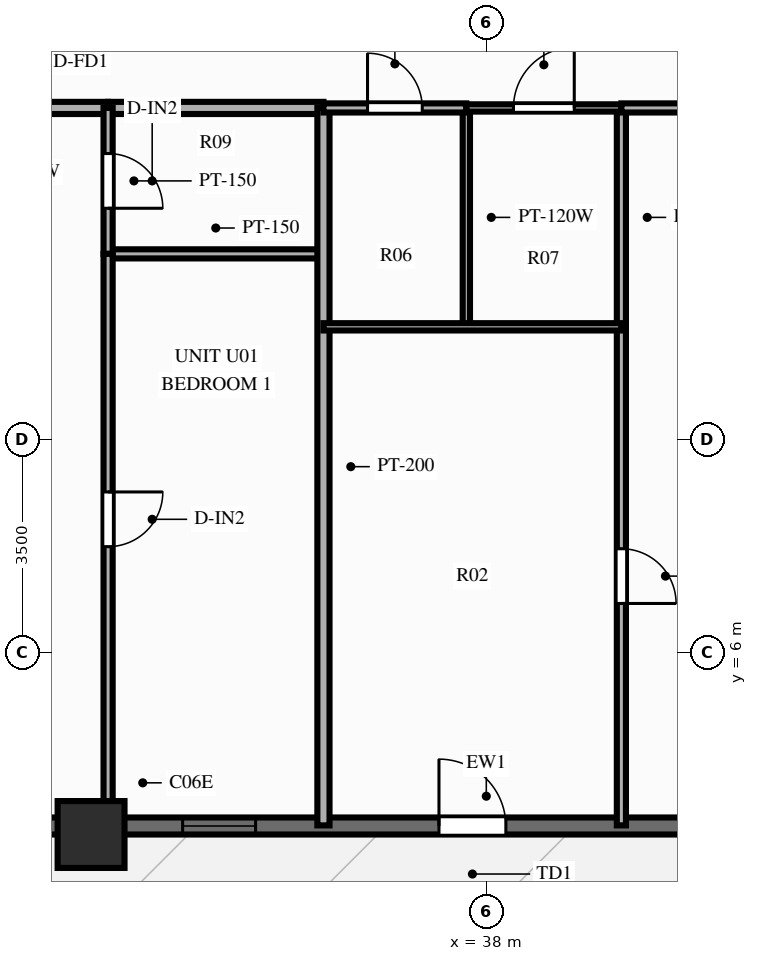
"""IFC4 building model, lengths in metres.
Left out: names, types, materials, properties, quantities, classifications, styles, units other than length and angle.
Written with IfcOpenShell. Run it as: python <this file> out.ifc"""

import sys

from ifc_helpers import new_model, si_unit, direction, frame, frame_2d, origin, origin_2d, place, context, subcontext, project, spatial, rectangle, extrude, source, transform, mapped, element, fill, save


model = new_model("IFC4")
c1 = context("Model", 3, precision=1e-05, world=origin(), true_north=direction((0.0, 1.0)))
c2 = subcontext(c1, "Body", "Model", "MODEL_VIEW")
j1 = project(units=[si_unit("LENGTHUNIT", "METRE"), si_unit("PLANEANGLEUNIT", "RADIAN")], contexts=[c1])
p1 = place(None, origin())
s1 = spatial("IfcSite", under=j1, at=p1, CompositionType="ELEMENT")
p2 = place(p1, origin())
s2 = spatial("IfcBuilding", under=s1, at=p2, CompositionType="ELEMENT")
p3 = place(p2, frame((0.0, 0.0, 49.4)))
s3 = spatial("IfcBuildingStorey", under=s2, at=p3, CompositionType="ELEMENT", Elevation=49.4)
m1 = source(origin(), c2, "Body", "SweptSolid", [
    extrude(rectangle(XDim=1.1, YDim=1.1, at=origin_2d()), origin(), (0.0, 0.0, 1.0), 3.0),
])
p4 = place(p3, frame((31.5, 3.0, 0.0), z_axis=(0.0, 0.0, 1.0), x_axis=(1.0, 0.0, 0.0)))
e1 = element("IfcColumn", 1, at=p4, inside=s3, PredefinedType="COLUMN", context=c2, shape_type="MappedRepresentation", body=[
    mapped(m1, transform((0.0, 0.0, 0.0), scale=1.0)),
])
p5 = place(p3, frame((15.5, 3.14, 0.0), z_axis=(0.0, 0.0, 1.0), x_axis=(1.0, 0.0, 0.0)))
e2 = element("IfcWall", 2, at=p5, inside=s3, PredefinedType="SOLIDWALL", context=c2, shape_type="SweptSolid", body=[
    extrude(rectangle(XDim=45.0, YDim=0.28, at=frame_2d((22.5, 0.0))), origin(), (0.0, 0.0, 1.0), 2.28),
])
p6 = place(p5, frame((2.135, 0.0, 0.25)))
e3 = element("IfcOpeningElement", 3, at=p6, cuts=e2, PredefinedType="OPENING", context=c2, shape_type="SweptSolid", body=[
    extrude(rectangle(XDim=1.2, YDim=1.5, at=frame_2d((0.6, 0.75))), frame((0.0, 0.152, 0.0), z_axis=(0.0, -1.0, 0.0), x_axis=(1.0, 0.0, 0.0)), (0.0, 0.0, 1.0), 0.304),
])
p7 = place(p5, frame((6.94, 0.0, 0.25)))
e4 = element("IfcOpeningElement", 4, at=p7, cuts=e2, PredefinedType="OPENING", context=c2, shape_type="SweptSolid", body=[
    extrude(rectangle(XDim=1.2, YDim=1.5, at=frame_2d((0.6, 0.75))), frame((0.0, 0.152, 0.0), z_axis=(0.0, -1.0, 0.0), x_axis=(1.0, 0.0, 0.0)), (0.0, 0.0, 1.0), 0.304),
])
p8 = place(p5, frame((10.776, 0.0, 0.25)))
e5 = element("IfcOpeningElement", 5, at=p8, cuts=e2, PredefinedType="OPENING", context=c2, shape_type="SweptSolid", body=[
    extrude(rectangle(XDim=1.2, YDim=1.5, at=frame_2d((0.6, 0.75))), frame((0.0, 0.152, 0.0), z_axis=(0.0, -1.0, 0.0), x_axis=(1.0, 0.0, 0.0)), (0.0, 0.0, 1.0), 0.304),
])
p9 = place(p5, frame((13.58, 0.0, 0.25)))
e6 = element("IfcOpeningElement", 6, at=p9, cuts=e2, PredefinedType="OPENING", context=c2, shape_type="SweptSolid", body=[
    extrude(rectangle(XDim=1.2, YDim=1.5, at=frame_2d((0.6, 0.75))), frame((0.0, 0.152, 0.0), z_axis=(0.0, -1.0, 0.0), x_axis=(1.0, 0.0, 0.0)), (0.0, 0.0, 1.0), 0.304),
])
p10 = place(p5, frame((17.506, 0.0, 0.25)))
e7 = element("IfcOpeningElement", 7, at=p10, cuts=e2, PredefinedType="OPENING", context=c2, shape_type="SweptSolid", body=[
    extrude(rectangle(XDim=1.2, YDim=1.5, at=frame_2d((0.6, 0.75))), frame((0.0, 0.152, 0.0), z_axis=(0.0, -1.0, 0.0), x_axis=(1.0, 0.0, 0.0)), (0.0, 0.0, 1.0), 0.304),
])
p11 = place(p5, frame((22.822, 0.0, 0.0), z_axis=(0.0, 0.0, 1.0), x_axis=(-1.0, 0.0, 0.0)))
e8 = element("IfcOpeningElement", 8, at=p11, cuts=e2, PredefinedType="OPENING", context=c2, shape_type="SweptSolid", body=[
    extrude(rectangle(XDim=1.1, YDim=2.15, at=frame_2d((0.55, 1.075))), frame((0.0, 0.152, 0.0), z_axis=(0.0, -1.0, 0.0), x_axis=(1.0, 0.0, 0.0)), (0.0, 0.0, 1.0), 0.304),
])
p12 = place(p5, frame((26.066, 0.0, 0.25)))
e9 = element("IfcOpeningElement", 9, at=p12, cuts=e2, PredefinedType="OPENING", context=c2, shape_type="SweptSolid", body=[
    extrude(rectangle(XDim=1.2, YDim=1.5, at=frame_2d((0.6, 0.75))), frame((0.0, 0.152, 0.0), z_axis=(0.0, -1.0, 0.0), x_axis=(1.0, 0.0, 0.0)), (0.0, 0.0, 1.0), 0.304),
])
p13 = place(p5, frame((30.255, 0.0, 0.25)))
e10 = element("IfcOpeningElement", 10, at=p13, cuts=e2, PredefinedType="OPENING", context=c2, shape_type="SweptSolid", body=[
    extrude(rectangle(XDim=1.2, YDim=1.5, at=frame_2d((0.6, 0.75))), frame((0.0, 0.152, 0.0), z_axis=(0.0, -1.0, 0.0), x_axis=(1.0, 0.0, 0.0)), (0.0, 0.0, 1.0), 0.304),
])
p14 = place(p5, frame((33.346, 0.0, 0.25)))
e11 = element("IfcOpeningElement", 11, at=p14, cuts=e2, PredefinedType="OPENING", context=c2, shape_type="SweptSolid", body=[
    extrude(rectangle(XDim=1.2, YDim=1.5, at=frame_2d((0.6, 0.75))), frame((0.0, 0.152, 0.0), z_axis=(0.0, -1.0, 0.0), x_axis=(1.0, 0.0, 0.0)), (0.0, 0.0, 1.0), 0.304),
])
p15 = place(p5, frame((37.821, 0.0, 0.25)))
e12 = element("IfcOpeningElement", 12, at=p15, cuts=e2, PredefinedType="OPENING", context=c2, shape_type="SweptSolid", body=[
    extrude(rectangle(XDim=1.2, YDim=1.5, at=frame_2d((0.6, 0.75))), frame((0.0, 0.152, 0.0), z_axis=(0.0, -1.0, 0.0), x_axis=(1.0, 0.0, 0.0)), (0.0, 0.0, 1.0), 0.304),
])
p16 = place(p5, frame((42.341, 0.0, 0.25)))
e13 = element("IfcOpeningElement", 13, at=p16, cuts=e2, PredefinedType="OPENING", context=c2, shape_type="SweptSolid", body=[
    extrude(rectangle(XDim=1.2, YDim=1.5, at=frame_2d((0.6, 0.75))), frame((0.0, 0.152, 0.0), z_axis=(0.0, -1.0, 0.0), x_axis=(1.0, 0.0, 0.0)), (0.0, 0.0, 1.0), 0.304),
])
p17 = place(p3, frame((28.25, 14.95, 0.0), z_axis=(0.0, 0.0, 1.0), x_axis=(1.0, 0.0, 0.0)))
e14 = element("IfcWall", 14, at=p17, inside=s3, PredefinedType="PARTITIONING", context=c2, shape_type="SweptSolid", body=[
    extrude(rectangle(XDim=3.53, YDim=0.2, at=frame_2d((1.765, 0.0))), origin(), (0.0, 0.0, 1.0), 2.79),
])
p18 = place(p17, frame((1.097, 0.0, 0.0)))
e15 = element("IfcOpeningElement", 15, at=p18, cuts=e14, PredefinedType="OPENING", context=c2, shape_type="SweptSolid", body=[
    extrude(rectangle(XDim=1.0, YDim=2.15, at=frame_2d((0.5, 1.075))), frame((0.0, 0.112, 0.0), z_axis=(0.0, -1.0, 0.0), x_axis=(1.0, 0.0, 0.0)), (0.0, 0.0, 1.0), 0.224),
])
p19 = place(p3, frame((31.78, 14.95, 0.0), z_axis=(0.0, 0.0, 1.0), x_axis=(1.0, 0.0, 0.0)))
e16 = element("IfcWall", 16, at=p19, inside=s3, PredefinedType="PARTITIONING", context=c2, shape_type="SweptSolid", body=[
    extrude(rectangle(XDim=3.542, YDim=0.2, at=frame_2d((1.771, 0.0))), origin(), (0.0, 0.0, 1.0), 2.79),
])
p20 = place(p3, frame((31.78, 12.55, 0.0), z_axis=(0.0, 0.0, 1.0), x_axis=(1.0, 0.0, 0.0)))
e17 = element("IfcWall", 17, at=p20, inside=s3, PredefinedType="PARTITIONING", context=c2, shape_type="SweptSolid", body=[
    extrude(rectangle(XDim=3.542, YDim=0.15, at=frame_2d((1.771, 0.0))), origin(), (0.0, 0.0, 1.0), 2.79),
])
p21 = place(p3, frame((31.78, 14.95, 0.0), z_axis=(0.0, 0.0, 1.0), x_axis=(0.0, -1.0, 0.0)))
e18 = element("IfcWall", 18, at=p21, inside=s3, PredefinedType="PARTITIONING", context=c2, shape_type="SweptSolid", body=[
    extrude(rectangle(XDim=2.4, YDim=0.15, at=frame_2d((1.2, 0.0))), origin(), (0.0, 0.0, 1.0), 2.79),
])
p22 = place(p21, frame((0.75, 0.0, 0.0)))
e19 = element("IfcOpeningElement", 19, at=p22, cuts=e18, PredefinedType="OPENING", context=c2, shape_type="SweptSolid", body=[
    extrude(rectangle(XDim=0.9, YDim=2.1, at=frame_2d((0.45, 1.05))), frame((0.0, 0.087, 0.0), z_axis=(0.0, -1.0, 0.0), x_axis=(1.0, 0.0, 0.0)), (0.0, 0.0, 1.0), 0.174),
])
p23 = place(p3, frame((31.78, 12.55, 0.0), z_axis=(0.0, 0.0, 1.0), x_axis=(0.0, -1.0, 0.0)))
e20 = element("IfcWall", 20, at=p23, inside=s3, PredefinedType="PARTITIONING", context=c2, shape_type="SweptSolid", body=[
    extrude(rectangle(XDim=9.4, YDim=0.15, at=frame_2d((4.7, 0.0))), origin(), (0.0, 0.0, 1.0), 2.79),
])
p24 = place(p23, frame((3.916, 0.0, 0.0)))
e21 = element("IfcOpeningElement", 21, at=p24, cuts=e20, PredefinedType="OPENING", context=c2, shape_type="SweptSolid", body=[
    extrude(rectangle(XDim=0.9, YDim=2.1, at=frame_2d((0.45, 1.05))), frame((0.0, 0.087, 0.0), z_axis=(0.0, -1.0, 0.0), x_axis=(1.0, 0.0, 0.0)), (0.0, 0.0, 1.0), 0.174),
])
p25 = place(p3, frame((35.322, 14.95, 0.0), z_axis=(0.0, 0.0, 1.0), x_axis=(0.0, -1.0, 0.0)))
e22 = element("IfcWall", 22, at=p25, inside=s3, PredefinedType="PARTITIONING", context=c2, shape_type="SweptSolid", body=[
    extrude(rectangle(XDim=11.8, YDim=0.2, at=frame_2d((5.9, 0.0))), origin(), (0.0, 0.0, 1.0), 2.79),
])
p26 = place(p3, frame((37.672, 14.95, 0.0), z_axis=(0.0, 0.0, 1.0), x_axis=(0.0, -1.0, 0.0)))
e23 = element("IfcWall", 23, at=p26, inside=s3, PredefinedType="PARTITIONING", context=c2, shape_type="SweptSolid", body=[
    extrude(rectangle(XDim=3.6, YDim=0.12, at=frame_2d((1.8, 0.0))), origin(), (0.0, 0.0, 1.0), 2.79),
])
p27 = place(p3, frame((40.222, 14.95, 0.0), z_axis=(0.0, 0.0, 1.0), x_axis=(0.0, -1.0, 0.0)))
e24 = element("IfcWall", 24, at=p27, inside=s3, PredefinedType="PARTITIONING", context=c2, shape_type="SweptSolid", body=[
    extrude(rectangle(XDim=3.6, YDim=0.15, at=frame_2d((1.8, 0.0))), origin(), (0.0, 0.0, 1.0), 2.79),
])
p28 = place(p3, frame((40.222, 11.35, 0.0), z_axis=(0.0, 0.0, 1.0), x_axis=(0.0, -1.0, 0.0)))
e25 = element("IfcWall", 25, at=p28, inside=s3, PredefinedType="PARTITIONING", context=c2, shape_type="SweptSolid", body=[
    extrude(rectangle(XDim=8.2, YDim=0.15, at=frame_2d((4.1, 0.0))), origin(), (0.0, 0.0, 1.0), 2.79),
])
p29 = place(p28, frame((3.65, 0.0, 0.0)))
e26 = element("IfcOpeningElement", 26, at=p29, cuts=e25, PredefinedType="OPENING", context=c2, shape_type="SweptSolid", body=[
    extrude(rectangle(XDim=0.9, YDim=2.1, at=frame_2d((0.45, 1.05))), frame((0.0, 0.087, 0.0), z_axis=(0.0, -1.0, 0.0), x_axis=(1.0, 0.0, 0.0)), (0.0, 0.0, 1.0), 0.174),
])
p30 = place(p3, frame((35.322, 11.35, 0.0), z_axis=(0.0, 0.0, 1.0), x_axis=(1.0, 0.0, 0.0)))
e27 = element("IfcWall", 27, at=p30, inside=s3, PredefinedType="PARTITIONING", context=c2, shape_type="SweptSolid", body=[
    extrude(rectangle(XDim=4.9, YDim=0.12, at=frame_2d((2.45, 0.0))), origin(), (0.0, 0.0, 1.0), 2.79),
])
p31 = place(p3, frame((35.322, 14.95, 0.0), z_axis=(0.0, 0.0, 1.0), x_axis=(1.0, 0.0, 0.0)))
e28 = element("IfcWall", 28, at=p31, inside=s3, PredefinedType="PARTITIONING", context=c2, shape_type="SweptSolid", body=[
    extrude(rectangle(XDim=2.35, YDim=0.15, at=frame_2d((1.175, 0.0))), origin(), (0.0, 0.0, 1.0), 2.79),
])
p32 = place(p31, frame((0.725, 0.0, 0.0)))
e29 = element("IfcOpeningElement", 29, at=p32, cuts=e28, PredefinedType="OPENING", context=c2, shape_type="SweptSolid", body=[
    extrude(rectangle(XDim=0.9, YDim=2.1, at=frame_2d((0.45, 1.05))), frame((0.0, 0.087, 0.0), z_axis=(0.0, -1.0, 0.0), x_axis=(1.0, 0.0, 0.0)), (0.0, 0.0, 1.0), 0.174),
])
p33 = place(p3, frame((37.672, 14.95, 0.0), z_axis=(0.0, 0.0, 1.0), x_axis=(1.0, 0.0, 0.0)))
e30 = element("IfcWall", 30, at=p33, inside=s3, PredefinedType="PARTITIONING", context=c2, shape_type="SweptSolid", body=[
    extrude(rectangle(XDim=2.55, YDim=0.12, at=frame_2d((1.275, 0.0))), origin(), (0.0, 0.0, 1.0), 2.79),
])
p34 = place(p33, frame((0.775, 0.0, 0.0)))
e31 = element("IfcOpeningElement", 31, at=p34, cuts=e30, PredefinedType="OPENING", context=c2, shape_type="SweptSolid", body=[
    extrude(rectangle(XDim=1.0, YDim=2.1, at=frame_2d((0.5, 1.05))), frame((0.0, 0.072, 0.0), z_axis=(0.0, -1.0, 0.0), x_axis=(1.0, 0.0, 0.0)), (0.0, 0.0, 1.0), 0.144),
])
p35 = place(p3, frame((40.222, 14.95, 0.0), z_axis=(0.0, 0.0, 1.0), x_axis=(1.0, 0.0, 0.0)))
e32 = element("IfcWall", 32, at=p35, inside=s3, PredefinedType="PARTITIONING", context=c2, shape_type="SweptSolid", body=[
    extrude(rectangle(XDim=7.599, YDim=0.15, at=frame_2d((3.8, 0.0))), origin(), (0.0, 0.0, 1.0), 2.79),
])
p36 = place(p35, frame((3.0, 0.0, 0.0)))
e33 = element("IfcOpeningElement", 33, at=p36, cuts=e32, PredefinedType="OPENING", context=c2, shape_type="SweptSolid", body=[
    extrude(rectangle(XDim=1.1, YDim=2.15, at=frame_2d((0.55, 1.075))), frame((0.0, 0.087, 0.0), z_axis=(0.0, -1.0, 0.0), x_axis=(1.0, 0.0, 0.0)), (0.0, 0.0, 1.0), 0.174),
])
m2 = source(origin(), c2, "Body", "SweptSolid", [
    extrude(rectangle(XDim=1.2, YDim=1.5, at=frame_2d((0.6, 0.75))), frame((0.0, 0.03, 0.0), z_axis=(0.0, -1.0, 0.0), x_axis=(1.0, 0.0, 0.0)), (0.0, 0.0, 1.0), 0.06),
])
p37 = place(p10, origin())
e34 = element("IfcWindow", 34, at=p37, inside=s3, PartitioningType="SINGLE_PANEL", PredefinedType="WINDOW", context=c2, shape_type="MappedRepresentation", body=[
    mapped(m2, transform((0.0, 0.0, 0.0), scale=1.0)),
])
fill(e7, e34)
m3 = source(origin(), c2, "Body", "SweptSolid", [
    extrude(rectangle(XDim=1.1, YDim=2.15, at=frame_2d((0.55, 1.075))), frame((0.0, 0.025, 0.0), z_axis=(0.0, -1.0, 0.0), x_axis=(1.0, 0.0, 0.0)), (0.0, 0.0, 1.0), 0.05),
])
p38 = place(p11, origin())
e35 = element("IfcDoor", 35, at=p38, inside=s3, OperationType="SINGLE_SWING_RIGHT", PredefinedType="DOOR", context=c2, shape_type="MappedRepresentation", body=[
    mapped(m3, transform((0.0, 0.0, 0.0), scale=1.0)),
])
fill(e8, e35)
m4 = source(origin(), c2, "Body", "SweptSolid", [
    extrude(rectangle(XDim=0.9, YDim=2.1, at=frame_2d((0.45, 1.05))), frame((0.0, 0.025, 0.0), z_axis=(0.0, -1.0, 0.0), x_axis=(1.0, 0.0, 0.0)), (0.0, 0.0, 1.0), 0.05),
])
p39 = place(p22, origin())
e36 = element("IfcDoor", 36, at=p39, inside=s3, OperationType="SINGLE_SWING_RIGHT", PredefinedType="DOOR", context=c2, shape_type="MappedRepresentation", body=[
    mapped(m4, transform((0.0, 0.0, 0.0), scale=1.0)),
])
fill(e19, e36)
p40 = place(p24, origin())
e37 = element("IfcDoor", 37, at=p40, inside=s3, OperationType="SINGLE_SWING_LEFT", PredefinedType="DOOR", context=c2, shape_type="MappedRepresentation", body=[
    mapped(m4, transform((0.0, 0.0, 0.0), scale=1.0)),
])
fill(e21, e37)
p41 = place(p29, origin())
e38 = element("IfcDoor", 38, at=p41, inside=s3, OperationType="SINGLE_SWING_RIGHT", PredefinedType="DOOR", context=c2, shape_type="MappedRepresentation", body=[
    mapped(m4, transform((0.0, 0.0, 0.0), scale=1.0)),
])
fill(e26, e38)
p42 = place(p32, origin())
e39 = element("IfcDoor", 39, at=p42, inside=s3, OperationType="SINGLE_SWING_LEFT", PredefinedType="DOOR", context=c2, shape_type="MappedRepresentation", body=[
    mapped(m4, transform((0.0, 0.0, 0.0), scale=1.0)),
])
fill(e29, e39)
m5 = source(origin(), c2, "Body", "SweptSolid", [
    extrude(rectangle(XDim=1.0, YDim=2.1, at=frame_2d((0.5, 1.05))), frame((0.0, 0.025, 0.0), z_axis=(0.0, -1.0, 0.0), x_axis=(1.0, 0.0, 0.0)), (0.0, 0.0, 1.0), 0.05),
])
p43 = place(p34, origin())
e40 = element("IfcDoor", 40, at=p43, inside=s3, OperationType="SINGLE_SWING_RIGHT", PredefinedType="DOOR", context=c2, shape_type="MappedRepresentation", body=[
    mapped(m5, transform((0.0, 0.0, 0.0), scale=1.0)),
])
fill(e31, e40)
save(model, sys.argv[1])
